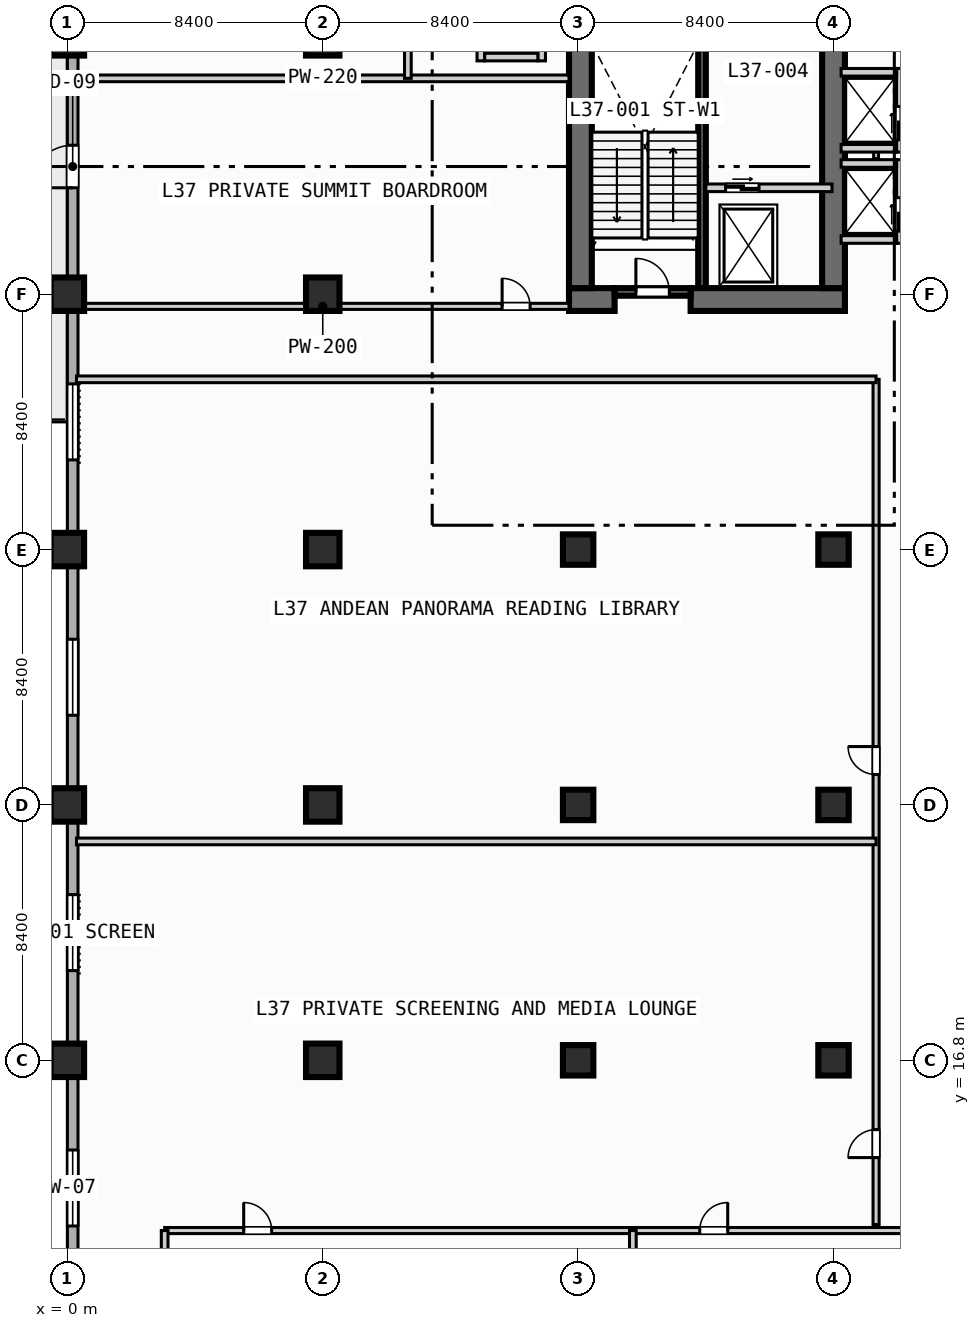
"""IFC4 building model, lengths in metres.
Left out: names, types, materials, properties, quantities, classifications, styles, units other than length and angle.
Written with IfcOpenShell. Run it as: python <this file> out.ifc"""

import sys

from ifc_helpers import new_model, si_unit, direction, frame, frame_2d, origin, origin_2d, place, context, subcontext, project, spatial, rectangle, extrude, element, fill, save


model = new_model("IFC4")
c1 = context("Model", 3, precision=1e-05, world=origin(), true_north=direction((0.0, 1.0)))
c2 = subcontext(c1, "Body", "Model", "MODEL_VIEW")
j1 = project(units=[si_unit("LENGTHUNIT", "METRE"), si_unit("PLANEANGLEUNIT", "RADIAN")], contexts=[c1])
p1 = place(None, origin())
s1 = spatial("IfcSite", under=j1, at=p1, CompositionType="ELEMENT")
p2 = place(p1, origin())
s2 = spatial("IfcBuilding", under=s1, at=p2, CompositionType="ELEMENT")
p3 = place(p2, frame((0.0, 0.0, 153.2)))
s3 = spatial("IfcBuildingStorey", under=s2, at=p3, CompositionType="ELEMENT", Elevation=153.2)
p4 = place(p3, frame((20.875, 42.2, 0.0), z_axis=(0.0, 0.0, 1.0), x_axis=(0.0, 1.0, 0.0)))
e1 = element("IfcWall", 1, at=p4, inside=s3, PredefinedType="SOLIDWALL", context=c2, shape_type="SweptSolid", body=[
    extrude(rectangle(XDim=8.05, YDim=0.25, at=frame_2d((4.025, 0.0))), origin(), (0.0, 0.0, 1.0), 4.15),
])
p5 = place(p3, frame((16.5, 41.825, 0.0), z_axis=(0.0, 0.0, 1.0), x_axis=(1.0, 0.0, 0.0)))
e2 = element("IfcWall", 2, at=p5, inside=s3, PredefinedType="SHEAR", context=c2, shape_type="SweptSolid", body=[
    extrude(rectangle(XDim=1.5, YDim=0.75, at=frame_2d((0.75, 0.0))), origin(), (0.0, 0.0, 1.0), 4.15),
])
p6 = place(p3, frame((20.5, 41.825, 0.0), z_axis=(0.0, 0.0, 1.0), x_axis=(1.0, 0.0, 0.0)))
e3 = element("IfcWall", 3, at=p6, inside=s3, PredefinedType="SHEAR", context=c2, shape_type="SweptSolid", body=[
    extrude(rectangle(XDim=5.075, YDim=0.75, at=frame_2d((2.538, 0.0))), origin(), (0.0, 0.0, 1.0), 4.15),
])
p7 = place(p3, frame((16.875, 42.2, 0.0), z_axis=(0.0, 0.0, 1.0), x_axis=(0.0, 1.0, 0.0)))
e4 = element("IfcWall", 4, at=p7, inside=s3, PredefinedType="SHEAR", context=c2, shape_type="SweptSolid", body=[
    extrude(rectangle(XDim=16.35, YDim=0.75, at=frame_2d((8.175, 0.0))), origin(), (0.0, 0.0, 1.0), 4.15),
])
p8 = place(p3, frame((25.2, 42.2, 0.0), z_axis=(0.0, 0.0, 1.0), x_axis=(0.0, 1.0, 0.0)))
e5 = element("IfcWall", 5, at=p8, inside=s3, PredefinedType="SHEAR", context=c2, shape_type="SweptSolid", body=[
    extrude(rectangle(XDim=8.6, YDim=0.75, at=frame_2d((4.3, 0.0))), origin(), (0.0, 0.0, 1.0), 4.15),
])
for number, where, z_axis, x_axis in (
    (6, (0.0, 16.8, 0.0), (0.0, 0.0, 1.0), (1.0, 0.0, 0.0)),
    (7, (0.0, 25.2, 0.0), (0.0, 0.0, 1.0), (1.0, 0.0, 0.0)),
    (8, (0.0, 33.6, 0.0), (0.0, 0.0, 1.0), (1.0, 0.0, 0.0)),
    (9, (0.0, 42.0, 0.0), (0.0, 0.0, 1.0), (1.0, 0.0, 0.0)),
    (10, (0.0, 50.4, 0.0), (0.0, 0.0, 1.0), (1.0, 0.0, 0.0)),
    (11, (8.4, 16.8, 0.0), (0.0, 0.0, 1.0), (1.0, 0.0, 0.0)),
    (12, (8.4, 25.2, 0.0), (0.0, 0.0, 1.0), (1.0, 0.0, 0.0)),
    (13, (8.4, 33.6, 0.0), (0.0, 0.0, 1.0), (1.0, 0.0, 0.0)),
    (14, (8.4, 42.0, 0.0), (0.0, 0.0, 1.0), (1.0, 0.0, 0.0)),
    (15, (8.4, 50.4, 0.0), (0.0, 0.0, 1.0), (1.0, 0.0, 0.0)),
):
    element("IfcColumn", number, at=place(p3, frame(where, z_axis=z_axis, x_axis=x_axis)), inside=s3, PredefinedType="COLUMN", context=c2, shape_type="SweptSolid", body=[
        extrude(rectangle(XDim=1.1, YDim=1.1, at=origin_2d()), origin(), (0.0, 0.0, 1.0), 4.4),
    ])
for number, where, z_axis, x_axis in (
    (16, (16.8, 16.8, 0.0), (0.0, 0.0, 1.0), (1.0, 0.0, 0.0)),
    (17, (16.8, 25.2, 0.0), (0.0, 0.0, 1.0), (1.0, 0.0, 0.0)),
    (18, (16.8, 33.6, 0.0), (0.0, 0.0, 1.0), (1.0, 0.0, 0.0)),
    (19, (25.2, 16.8, 0.0), (0.0, 0.0, 1.0), (1.0, 0.0, 0.0)),
    (20, (25.2, 25.2, 0.0), (0.0, 0.0, 1.0), (1.0, 0.0, 0.0)),
    (21, (25.2, 33.6, 0.0), (0.0, 0.0, 1.0), (1.0, 0.0, 0.0)),
):
    element("IfcColumn", number, at=place(p3, frame(where, z_axis=z_axis, x_axis=x_axis)), inside=s3, PredefinedType="COLUMN", context=c2, shape_type="SweptSolid", body=[
        extrude(rectangle(XDim=1.0, YDim=1.0, at=origin_2d()), origin(), (0.0, 0.0, 1.0), 4.4),
    ])
p9 = place(p3, frame((0.175, 3.175, 0.0), z_axis=(0.0, 0.0, 1.0), x_axis=(0.0, 1.0, 0.0)))
e22 = element("IfcWall", 22, at=p9, inside=s3, PredefinedType="STANDARD", context=c2, shape_type="SweptSolid", body=[
    extrude(rectangle(XDim=69.25, YDim=0.35, at=frame_2d((34.625, 0.0))), origin(), (0.0, 0.0, 1.0), 4.15),
])
p10 = place(p9, frame((42.325, 0.0, 0.0)))
e23 = element("IfcOpeningElement", 23, at=p10, cuts=e22, PredefinedType="OPENING", context=c2, shape_type="SweptSolid", body=[
    extrude(rectangle(XDim=1.4, YDim=2.2, at=frame_2d((0.7, 1.1))), frame((0.0, 0.185, 0.0), z_axis=(0.0, -1.0, 0.0), x_axis=(1.0, 0.0, 0.0)), (0.0, 0.0, 1.0), 0.37),
])
p11 = place(p9, frame((8.175, 0.0, 0.85)))
e24 = element("IfcOpeningElement", 24, at=p11, cuts=e22, PredefinedType="OPENING", context=c2, shape_type="SweptSolid", body=[
    extrude(rectangle(XDim=2.5, YDim=2.2, at=frame_2d((1.25, 1.1))), frame((0.0, 0.185, 0.0), z_axis=(0.0, -1.0, 0.0), x_axis=(1.0, 0.0, 0.0)), (0.0, 0.0, 1.0), 0.37),
])
p12 = place(p9, frame((16.575, 0.0, 0.85)))
e25 = element("IfcOpeningElement", 25, at=p12, cuts=e22, PredefinedType="OPENING", context=c2, shape_type="SweptSolid", body=[
    extrude(rectangle(XDim=2.5, YDim=2.2, at=frame_2d((1.25, 1.1))), frame((0.0, 0.185, 0.0), z_axis=(0.0, -1.0, 0.0), x_axis=(1.0, 0.0, 0.0)), (0.0, 0.0, 1.0), 0.37),
])
p13 = place(p9, frame((24.975, 0.0, 0.85)))
e26 = element("IfcOpeningElement", 26, at=p13, cuts=e22, PredefinedType="OPENING", context=c2, shape_type="SweptSolid", body=[
    extrude(rectangle(XDim=2.5, YDim=2.2, at=frame_2d((1.25, 1.1))), frame((0.0, 0.185, 0.0), z_axis=(0.0, -1.0, 0.0), x_axis=(1.0, 0.0, 0.0)), (0.0, 0.0, 1.0), 0.37),
])
p14 = place(p9, frame((33.375, 0.0, 0.85)))
e27 = element("IfcOpeningElement", 27, at=p14, cuts=e22, PredefinedType="OPENING", context=c2, shape_type="SweptSolid", body=[
    extrude(rectangle(XDim=2.5, YDim=2.2, at=frame_2d((1.25, 1.1))), frame((0.0, 0.185, 0.0), z_axis=(0.0, -1.0, 0.0), x_axis=(1.0, 0.0, 0.0)), (0.0, 0.0, 1.0), 0.37),
])
p15 = place(p3, frame((18.0, 42.075, 0.0), z_axis=(0.0, 0.0, 1.0), x_axis=(1.0, 0.0, 0.0)))
e28 = element("IfcWall", 28, at=p15, inside=s3, PredefinedType="SOLIDWALL", context=c2, shape_type="SweptSolid", body=[
    extrude(rectangle(XDim=2.5, YDim=0.25, at=frame_2d((1.25, 0.0))), origin(), (0.0, 0.0, 1.0), 4.15),
])
p16 = place(p15, frame((0.7, 0.0, 0.0)))
e29 = element("IfcOpeningElement", 29, at=p16, cuts=e28, PredefinedType="OPENING", context=c2, shape_type="SweptSolid", body=[
    extrude(rectangle(XDim=1.1, YDim=2.15, at=frame_2d((0.55, 1.075))), frame((0.0, 0.135, 0.0), z_axis=(0.0, -1.0, 0.0), x_axis=(1.0, 0.0, 0.0)), (0.0, 0.0, 1.0), 0.27),
])
p17 = place(p3, frame((21.0, 45.5, 0.0), z_axis=(0.0, 0.0, 1.0), x_axis=(1.0, 0.0, 0.0)))
e30 = element("IfcWall", 30, at=p17, inside=s3, PredefinedType="SOLIDWALL", context=c2, shape_type="SweptSolid", body=[
    extrude(rectangle(XDim=4.15, YDim=0.25, at=frame_2d((2.075, 0.0))), origin(), (0.0, 0.0, 1.0), 4.15),
])
p18 = place(p17, frame((0.65, 0.0, 0.0)))
e31 = element("IfcOpeningElement", 31, at=p18, cuts=e30, PredefinedType="OPENING", context=c2, shape_type="SweptSolid", body=[
    extrude(rectangle(XDim=1.1, YDim=2.15, at=frame_2d((0.55, 1.075))), frame((0.0, 0.135, 0.0), z_axis=(0.0, -1.0, 0.0), x_axis=(1.0, 0.0, 0.0)), (0.0, 0.0, 1.0), 0.27),
])
p19 = place(p3, frame((13.6, 49.675, 0.0), z_axis=(0.0, 0.0, 1.0), x_axis=(0.0, 1.0, 0.0)))
e32 = element("IfcWall", 32, at=p19, inside=s3, PredefinedType="SOLIDWALL", context=c2, shape_type="SweptSolid", body=[
    extrude(rectangle(XDim=2.75, YDim=0.25, at=frame_2d((1.375, 0.0))), origin(), (0.0, 0.0, 1.0), 4.15),
])
p20 = place(p19, frame((0.4, 0.0, 0.0)))
e33 = element("IfcOpeningElement", 33, at=p20, cuts=e32, PredefinedType="OPENING", context=c2, shape_type="SweptSolid", body=[
    extrude(rectangle(XDim=1.1, YDim=2.15, at=frame_2d((0.55, 1.075))), frame((0.0, 0.135, 0.0), z_axis=(0.0, -1.0, 0.0), x_axis=(1.0, 0.0, 0.0)), (0.0, 0.0, 1.0), 0.27),
])
p21 = place(p3, frame((15.6, 49.675, 0.0), z_axis=(0.0, 0.0, 1.0), x_axis=(0.0, 1.0, 0.0)))
e34 = element("IfcWall", 34, at=p21, inside=s3, PredefinedType="SOLIDWALL", context=c2, shape_type="SweptSolid", body=[
    extrude(rectangle(XDim=2.75, YDim=0.25, at=frame_2d((1.375, 0.0))), origin(), (0.0, 0.0, 1.0), 4.15),
])
p22 = place(p3, frame((13.725, 49.8, 0.0), z_axis=(0.0, 0.0, 1.0), x_axis=(1.0, 0.0, 0.0)))
e35 = element("IfcWall", 35, at=p22, inside=s3, PredefinedType="SOLIDWALL", context=c2, shape_type="SweptSolid", body=[
    extrude(rectangle(XDim=1.75, YDim=0.25, at=frame_2d((0.875, 0.0))), origin(), (0.0, 0.0, 1.0), 4.15),
])
p23 = place(p3, frame((27.4, 43.675, 0.0), z_axis=(0.0, 0.0, 1.0), x_axis=(0.0, 1.0, 0.0)))
e36 = element("IfcWall", 36, at=p23, inside=s3, PredefinedType="SOLIDWALL", context=c2, shape_type="SweptSolid", body=[
    extrude(rectangle(XDim=2.75, YDim=0.25, at=frame_2d((1.375, 0.0))), origin(), (0.0, 0.0, 1.0), 4.15),
])
p24 = place(p23, frame((0.4, 0.0, 0.0)))
e37 = element("IfcOpeningElement", 37, at=p24, cuts=e36, PredefinedType="OPENING", context=c2, shape_type="SweptSolid", body=[
    extrude(rectangle(XDim=1.1, YDim=2.15, at=frame_2d((0.55, 1.075))), frame((0.0, 0.135, 0.0), z_axis=(0.0, -1.0, 0.0), x_axis=(1.0, 0.0, 0.0)), (0.0, 0.0, 1.0), 0.27),
])
for number, where, z_axis, x_axis in (
    (38, (25.45, 43.8, 0.0), (0.0, 0.0, 1.0), (1.0, 0.0, 0.0)),
    (39, (25.45, 46.3, 0.0), (0.0, 0.0, 1.0), (1.0, 0.0, 0.0)),
):
    element("IfcWall", number, at=place(p3, frame(where, z_axis=z_axis, x_axis=x_axis)), inside=s3, PredefinedType="SOLIDWALL", context=c2, shape_type="SweptSolid", body=[
        extrude(rectangle(XDim=1.825, YDim=0.25, at=frame_2d((0.913, 0.0))), origin(), (0.0, 0.0, 1.0), 4.15),
    ])
p25 = place(p3, frame((26.6, 46.46, 0.0), z_axis=(0.0, 0.0, 1.0), x_axis=(0.0, 1.0, 0.0)))
e40 = element("IfcWall", 40, at=p25, inside=s3, PredefinedType="PARTITIONING", context=c2, shape_type="SweptSolid", body=[
    extrude(rectangle(XDim=0.88, YDim=0.16, at=frame_2d((0.44, 0.0))), origin(), (0.0, 0.0, 1.0), 4.15),
])
p26 = place(p3, frame((27.4, 46.675, 0.0), z_axis=(0.0, 0.0, 1.0), x_axis=(0.0, 1.0, 0.0)))
e41 = element("IfcWall", 41, at=p26, inside=s3, PredefinedType="SOLIDWALL", context=c2, shape_type="SweptSolid", body=[
    extrude(rectangle(XDim=2.75, YDim=0.25, at=frame_2d((1.375, 0.0))), origin(), (0.0, 0.0, 1.0), 4.15),
])
p27 = place(p26, frame((0.4, 0.0, 0.0)))
e42 = element("IfcOpeningElement", 42, at=p27, cuts=e41, PredefinedType="OPENING", context=c2, shape_type="SweptSolid", body=[
    extrude(rectangle(XDim=1.1, YDim=2.15, at=frame_2d((0.55, 1.075))), frame((0.0, 0.135, 0.0), z_axis=(0.0, -1.0, 0.0), x_axis=(1.0, 0.0, 0.0)), (0.0, 0.0, 1.0), 0.27),
])
for number, where, z_axis, x_axis in (
    (43, (25.45, 46.8, 0.0), (0.0, 0.0, 1.0), (1.0, 0.0, 0.0)),
    (44, (25.45, 49.3, 0.0), (0.0, 0.0, 1.0), (1.0, 0.0, 0.0)),
):
    element("IfcWall", number, at=place(p3, frame(where, z_axis=z_axis, x_axis=x_axis)), inside=s3, PredefinedType="SOLIDWALL", context=c2, shape_type="SweptSolid", body=[
        extrude(rectangle(XDim=1.825, YDim=0.25, at=frame_2d((0.913, 0.0))), origin(), (0.0, 0.0, 1.0), 4.15),
    ])
p28 = place(p3, frame((0.3, 41.6, 0.0), z_axis=(0.0, 0.0, 1.0), x_axis=(1.0, 0.0, 0.0)))
e45 = element("IfcWall", 45, at=p28, inside=s3, PredefinedType="PARTITIONING", context=c2, shape_type="SweptSolid", body=[
    extrude(rectangle(XDim=16.2, YDim=0.2, at=frame_2d((8.1, 0.0))), origin(), (0.0, 0.0, 1.0), 4.15),
])
p29 = place(p28, frame((14.0, 0.0, 0.0)))
e46 = element("IfcOpeningElement", 46, at=p29, cuts=e45, PredefinedType="OPENING", context=c2, shape_type="SweptSolid", body=[
    extrude(rectangle(XDim=0.92, YDim=2.1, at=frame_2d((0.46, 1.05))), frame((0.0, 0.11, 0.0), z_axis=(0.0, -1.0, 0.0), x_axis=(1.0, 0.0, 0.0)), (0.0, 0.0, 1.0), 0.22),
])
p30 = place(p3, frame((0.3, 49.1, 0.0), z_axis=(0.0, 0.0, 1.0), x_axis=(1.0, 0.0, 0.0)))
e47 = element("IfcWall", 47, at=p30, inside=s3, PredefinedType="PARTITIONING", context=c2, shape_type="SweptSolid", body=[
    extrude(rectangle(XDim=16.2, YDim=0.22, at=frame_2d((8.1, 0.0))), origin(), (0.0, 0.0, 1.0), 4.15),
])
p31 = place(p3, frame((11.2, 49.1, 0.0), z_axis=(0.0, 0.0, 1.0), x_axis=(0.0, 1.0, 0.0)))
e48 = element("IfcWall", 48, at=p31, inside=s3, PredefinedType="PARTITIONING", context=c2, shape_type="SweptSolid", body=[
    extrude(rectangle(XDim=9.3, YDim=0.22, at=frame_2d((4.65, 0.0))), origin(), (0.0, 0.0, 1.0), 4.15),
])
p32 = place(p3, frame((3.2, 11.2, 0.0), z_axis=(0.0, 0.0, 1.0), x_axis=(1.0, 0.0, 0.0)))
e49 = element("IfcWall", 49, at=p32, inside=s3, PredefinedType="PARTITIONING", context=c2, shape_type="SweptSolid", body=[
    extrude(rectangle(XDim=30.0, YDim=0.2, at=frame_2d((15.0, 0.0))), origin(), (0.0, 0.0, 1.0), 4.15),
])
p33 = place(p32, frame((2.6, 0.0, 0.0)))
e50 = element("IfcOpeningElement", 50, at=p33, cuts=e49, PredefinedType="OPENING", context=c2, shape_type="SweptSolid", body=[
    extrude(rectangle(XDim=0.92, YDim=2.1, at=frame_2d((0.46, 1.05))), frame((0.0, 0.11, 0.0), z_axis=(0.0, -1.0, 0.0), x_axis=(1.0, 0.0, 0.0)), (0.0, 0.0, 1.0), 0.22),
])
p34 = place(p32, frame((17.6, 0.0, 0.0)))
e51 = element("IfcOpeningElement", 51, at=p34, cuts=e49, PredefinedType="OPENING", context=c2, shape_type="SweptSolid", body=[
    extrude(rectangle(XDim=0.92, YDim=2.1, at=frame_2d((0.46, 1.05))), frame((0.0, 0.11, 0.0), z_axis=(0.0, -1.0, 0.0), x_axis=(1.0, 0.0, 0.0)), (0.0, 0.0, 1.0), 0.22),
])
p35 = place(p3, frame((3.2, 3.45, 0.0), z_axis=(0.0, 0.0, 1.0), x_axis=(0.0, 1.0, 0.0)))
e52 = element("IfcWall", 52, at=p35, inside=s3, PredefinedType="PARTITIONING", context=c2, shape_type="SweptSolid", body=[
    extrude(rectangle(XDim=7.75, YDim=0.22, at=frame_2d((3.875, 0.0))), origin(), (0.0, 0.0, 1.0), 4.15),
])
p36 = place(p3, frame((18.6, 0.3, 0.0), z_axis=(0.0, 0.0, 1.0), x_axis=(0.0, 1.0, 0.0)))
e53 = element("IfcWall", 53, at=p36, inside=s3, PredefinedType="PARTITIONING", context=c2, shape_type="SweptSolid", body=[
    extrude(rectangle(XDim=10.9, YDim=0.22, at=frame_2d((5.45, 0.0))), origin(), (0.0, 0.0, 1.0), 4.15),
])
p37 = place(p3, frame((26.6, 11.4, 0.0), z_axis=(0.0, 0.0, 1.0), x_axis=(0.0, 1.0, 0.0)))
e54 = element("IfcWall", 54, at=p37, inside=s3, PredefinedType="PARTITIONING", context=c2, shape_type="SweptSolid", body=[
    extrude(rectangle(XDim=27.8, YDim=0.2, at=frame_2d((13.9, 0.0))), origin(), (0.0, 0.0, 1.0), 4.15),
])
p38 = place(p37, frame((2.2, 0.0, 0.0)))
e55 = element("IfcOpeningElement", 55, at=p38, cuts=e54, PredefinedType="OPENING", context=c2, shape_type="SweptSolid", body=[
    extrude(rectangle(XDim=0.92, YDim=2.1, at=frame_2d((0.46, 1.05))), frame((0.0, 0.11, 0.0), z_axis=(0.0, -1.0, 0.0), x_axis=(1.0, 0.0, 0.0)), (0.0, 0.0, 1.0), 0.22),
])
p39 = place(p37, frame((14.8, 0.0, 0.0)))
e56 = element("IfcOpeningElement", 56, at=p39, cuts=e54, PredefinedType="OPENING", context=c2, shape_type="SweptSolid", body=[
    extrude(rectangle(XDim=0.92, YDim=2.1, at=frame_2d((0.46, 1.05))), frame((0.0, 0.11, 0.0), z_axis=(0.0, -1.0, 0.0), x_axis=(1.0, 0.0, 0.0)), (0.0, 0.0, 1.0), 0.22),
])
for number, where, z_axis, x_axis in (
    (57, (0.3, 24.0, 0.0), (0.0, 0.0, 1.0), (1.0, 0.0, 0.0)),
    (58, (0.3, 39.2, 0.0), (0.0, 0.0, 1.0), (1.0, 0.0, 0.0)),
):
    element("IfcWall", number, at=place(p3, frame(where, z_axis=z_axis, x_axis=x_axis)), inside=s3, PredefinedType="PARTITIONING", context=c2, shape_type="SweptSolid", body=[
        extrude(rectangle(XDim=26.3, YDim=0.22, at=frame_2d((13.15, 0.0))), origin(), (0.0, 0.0, 1.0), 4.15),
    ])
p40 = place(p10, origin())
e59 = element("IfcDoor", 59, at=p40, inside=s3, OperationType="SINGLE_SWING_LEFT", PredefinedType="DOOR", context=c2, shape_type="SweptSolid", body=[
    extrude(rectangle(XDim=1.4, YDim=2.2, at=frame_2d((0.7, 1.1))), frame((0.0, 0.025, 0.0), z_axis=(0.0, -1.0, 0.0), x_axis=(1.0, 0.0, 0.0)), (0.0, 0.0, 1.0), 0.05),
])
fill(e23, e59)
p41 = place(p11, origin())
e60 = element("IfcWindow", 60, at=p41, inside=s3, PartitioningType="SINGLE_PANEL", PredefinedType="WINDOW", context=c2, shape_type="SweptSolid", body=[
    extrude(rectangle(XDim=2.5, YDim=2.2, at=frame_2d((1.25, 1.1))), frame((0.0, 0.03, 0.0), z_axis=(0.0, -1.0, 0.0), x_axis=(1.0, 0.0, 0.0)), (0.0, 0.0, 1.0), 0.06),
])
fill(e24, e60)
p42 = place(p12, origin())
e61 = element("IfcWindow", 61, at=p42, inside=s3, PartitioningType="SINGLE_PANEL", PredefinedType="WINDOW", context=c2, shape_type="SweptSolid", body=[
    extrude(rectangle(XDim=2.5, YDim=2.2, at=frame_2d((1.25, 1.1))), frame((0.0, 0.03, 0.0), z_axis=(0.0, -1.0, 0.0), x_axis=(1.0, 0.0, 0.0)), (0.0, 0.0, 1.0), 0.06),
])
fill(e25, e61)
p43 = place(p13, origin())
e62 = element("IfcWindow", 62, at=p43, inside=s3, PartitioningType="SINGLE_PANEL", PredefinedType="WINDOW", context=c2, shape_type="SweptSolid", body=[
    extrude(rectangle(XDim=2.5, YDim=2.2, at=frame_2d((1.25, 1.1))), frame((0.0, 0.03, 0.0), z_axis=(0.0, -1.0, 0.0), x_axis=(1.0, 0.0, 0.0)), (0.0, 0.0, 1.0), 0.06),
])
fill(e26, e62)
p44 = place(p14, origin())
e63 = element("IfcWindow", 63, at=p44, inside=s3, PartitioningType="SINGLE_PANEL", PredefinedType="WINDOW", context=c2, shape_type="SweptSolid", body=[
    extrude(rectangle(XDim=2.5, YDim=2.2, at=frame_2d((1.25, 1.1))), frame((0.0, 0.03, 0.0), z_axis=(0.0, -1.0, 0.0), x_axis=(1.0, 0.0, 0.0)), (0.0, 0.0, 1.0), 0.06),
])
fill(e27, e63)
p45 = place(p16, origin())
e64 = element("IfcDoor", 64, at=p45, inside=s3, OperationType="SINGLE_SWING_LEFT", PredefinedType="DOOR", context=c2, shape_type="SweptSolid", body=[
    extrude(rectangle(XDim=1.1, YDim=2.15, at=frame_2d((0.55, 1.075))), frame((0.0, 0.025, 0.0), z_axis=(0.0, -1.0, 0.0), x_axis=(1.0, 0.0, 0.0)), (0.0, 0.0, 1.0), 0.05),
])
fill(e29, e64)
p46 = place(p18, origin())
e65 = element("IfcDoor", 65, at=p46, inside=s3, OperationType="SLIDING_TO_LEFT", PredefinedType="DOOR", context=c2, shape_type="SweptSolid", body=[
    extrude(rectangle(XDim=1.1, YDim=2.15, at=frame_2d((0.55, 1.075))), frame((0.0, 0.025, 0.0), z_axis=(0.0, -1.0, 0.0), x_axis=(1.0, 0.0, 0.0)), (0.0, 0.0, 1.0), 0.05),
])
fill(e31, e65)
p47 = place(p24, origin())
e66 = element("IfcDoor", 66, at=p47, inside=s3, OperationType="SLIDING_TO_LEFT", PredefinedType="DOOR", context=c2, shape_type="SweptSolid", body=[
    extrude(rectangle(XDim=1.1, YDim=2.15, at=frame_2d((0.55, 1.075))), frame((0.0, 0.025, 0.0), z_axis=(0.0, -1.0, 0.0), x_axis=(1.0, 0.0, 0.0)), (0.0, 0.0, 1.0), 0.05),
])
fill(e37, e66)
p48 = place(p27, origin())
e67 = element("IfcDoor", 67, at=p48, inside=s3, OperationType="SLIDING_TO_LEFT", PredefinedType="DOOR", context=c2, shape_type="SweptSolid", body=[
    extrude(rectangle(XDim=1.1, YDim=2.15, at=frame_2d((0.55, 1.075))), frame((0.0, 0.025, 0.0), z_axis=(0.0, -1.0, 0.0), x_axis=(1.0, 0.0, 0.0)), (0.0, 0.0, 1.0), 0.05),
])
fill(e42, e67)
p49 = place(p29, origin())
e68 = element("IfcDoor", 68, at=p49, inside=s3, OperationType="SINGLE_SWING_LEFT", PredefinedType="DOOR", context=c2, shape_type="SweptSolid", body=[
    extrude(rectangle(XDim=0.92, YDim=2.1, at=frame_2d((0.46, 1.05))), frame((0.0, 0.025, 0.0), z_axis=(0.0, -1.0, 0.0), x_axis=(1.0, 0.0, 0.0)), (0.0, 0.0, 1.0), 0.05),
])
fill(e46, e68)
p50 = place(p33, origin())
e69 = element("IfcDoor", 69, at=p50, inside=s3, OperationType="SINGLE_SWING_LEFT", PredefinedType="DOOR", context=c2, shape_type="SweptSolid", body=[
    extrude(rectangle(XDim=0.92, YDim=2.1, at=frame_2d((0.46, 1.05))), frame((0.0, 0.025, 0.0), z_axis=(0.0, -1.0, 0.0), x_axis=(1.0, 0.0, 0.0)), (0.0, 0.0, 1.0), 0.05),
])
fill(e50, e69)
p51 = place(p34, origin())
e70 = element("IfcDoor", 70, at=p51, inside=s3, OperationType="SINGLE_SWING_RIGHT", PredefinedType="DOOR", context=c2, shape_type="SweptSolid", body=[
    extrude(rectangle(XDim=0.92, YDim=2.1, at=frame_2d((0.46, 1.05))), frame((0.0, 0.025, 0.0), z_axis=(0.0, -1.0, 0.0), x_axis=(1.0, 0.0, 0.0)), (0.0, 0.0, 1.0), 0.05),
])
fill(e51, e70)
p52 = place(p38, origin())
e71 = element("IfcDoor", 71, at=p52, inside=s3, OperationType="SINGLE_SWING_LEFT", PredefinedType="DOOR", context=c2, shape_type="SweptSolid", body=[
    extrude(rectangle(XDim=0.92, YDim=2.1, at=frame_2d((0.46, 1.05))), frame((0.0, 0.025, 0.0), z_axis=(0.0, -1.0, 0.0), x_axis=(1.0, 0.0, 0.0)), (0.0, 0.0, 1.0), 0.05),
])
fill(e55, e71)
p53 = place(p39, origin())
e72 = element("IfcDoor", 72, at=p53, inside=s3, OperationType="SINGLE_SWING_RIGHT", PredefinedType="DOOR", context=c2, shape_type="SweptSolid", body=[
    extrude(rectangle(XDim=0.92, YDim=2.1, at=frame_2d((0.46, 1.05))), frame((0.0, 0.025, 0.0), z_axis=(0.0, -1.0, 0.0), x_axis=(1.0, 0.0, 0.0)), (0.0, 0.0, 1.0), 0.05),
])
fill(e56, e72)
save(model, sys.argv[1])
